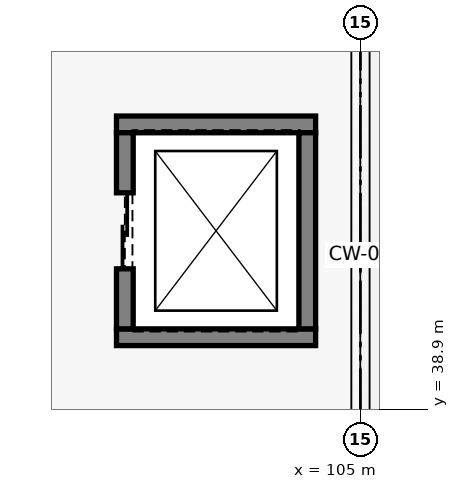
"""IFC4 building model, lengths in metres.
Left out: names, types, materials, properties, quantities, classifications, styles, units other than length and angle.
Written with IfcOpenShell. Run it as: python <this file> out.ifc"""

import sys

from ifc_helpers import new_model, si_unit, direction, frame, frame_2d, origin, place, context, subcontext, project, spatial, rectangle, extrude, element, fill, save


model = new_model("IFC4")
c1 = context("Model", 3, precision=1e-05, world=origin(), true_north=direction((0.0, 1.0)))
c2 = subcontext(c1, "Body", "Model", "MODEL_VIEW")
j1 = project(units=[si_unit("LENGTHUNIT", "METRE"), si_unit("PLANEANGLEUNIT", "RADIAN")], contexts=[c1])
p1 = place(None, origin())
s1 = spatial("IfcSite", under=j1, at=p1, CompositionType="ELEMENT")
p2 = place(p1, origin())
s2 = spatial("IfcBuilding", under=s1, at=p2, CompositionType="ELEMENT")
p3 = place(p2, origin())
s3 = spatial("IfcBuildingStorey", under=s2, at=p3, CompositionType="ELEMENT", Elevation=0.0)
for number, where, z_axis, x_axis in (
    (1, (101.79, 39.85, 0.0), (0.0, 0.0, 1.0), (1.0, 0.0, 0.0)),
    (2, (101.79, 42.65, 0.0), (0.0, 0.0, 1.0), (1.0, 0.0, 0.0)),
):
    element("IfcWall", number, at=place(p3, frame(where, z_axis=z_axis, x_axis=x_axis)), inside=s3, PredefinedType="SOLIDWALL", context=c2, shape_type="SweptSolid", body=[
        extrude(rectangle(XDim=2.62, YDim=0.22, at=frame_2d((1.31, 0.0))), origin(), (0.0, 0.0, 1.0), 4.5),
    ])
p4 = place(p3, frame((101.9, 39.96, 0.0), z_axis=(0.0, 0.0, 1.0), x_axis=(0.0, 1.0, 0.0)))
e3 = element("IfcWall", 3, at=p4, inside=s3, PredefinedType="SOLIDWALL", context=c2, shape_type="SweptSolid", body=[
    extrude(rectangle(XDim=2.58, YDim=0.22, at=frame_2d((1.29, 0.0))), origin(), (0.0, 0.0, 1.0), 4.5),
])
p5 = place(p4, frame((0.79, 0.0, 0.0)))
e4 = element("IfcOpeningElement", 4, at=p5, cuts=e3, PredefinedType="OPENING", context=c2, shape_type="SweptSolid", body=[
    extrude(rectangle(XDim=1.0, YDim=2.15, at=frame_2d((0.5, 1.075))), frame((0.0, 0.12, 0.0), z_axis=(0.0, -1.0, 0.0), x_axis=(1.0, 0.0, 0.0)), (0.0, 0.0, 1.0), 0.24),
])
p6 = place(p3, frame((104.3, 39.96, 0.0), z_axis=(0.0, 0.0, 1.0), x_axis=(0.0, 1.0, 0.0)))
e5 = element("IfcWall", 5, at=p6, inside=s3, PredefinedType="SOLIDWALL", context=c2, shape_type="SweptSolid", body=[
    extrude(rectangle(XDim=2.58, YDim=0.22, at=frame_2d((1.29, 0.0))), origin(), (0.0, 0.0, 1.0), 4.5),
])
p7 = place(p5, origin())
e6 = element("IfcDoor", 6, at=p7, inside=s3, OperationType="SLIDING_TO_LEFT", PredefinedType="DOOR", context=c2, shape_type="SweptSolid", body=[
    extrude(rectangle(XDim=1.0, YDim=2.15, at=frame_2d((0.5, 1.075))), frame((0.0, 0.025, 0.0), z_axis=(0.0, -1.0, 0.0), x_axis=(1.0, 0.0, 0.0)), (0.0, 0.0, 1.0), 0.05),
])
fill(e4, e6)
save(model, sys.argv[1])
